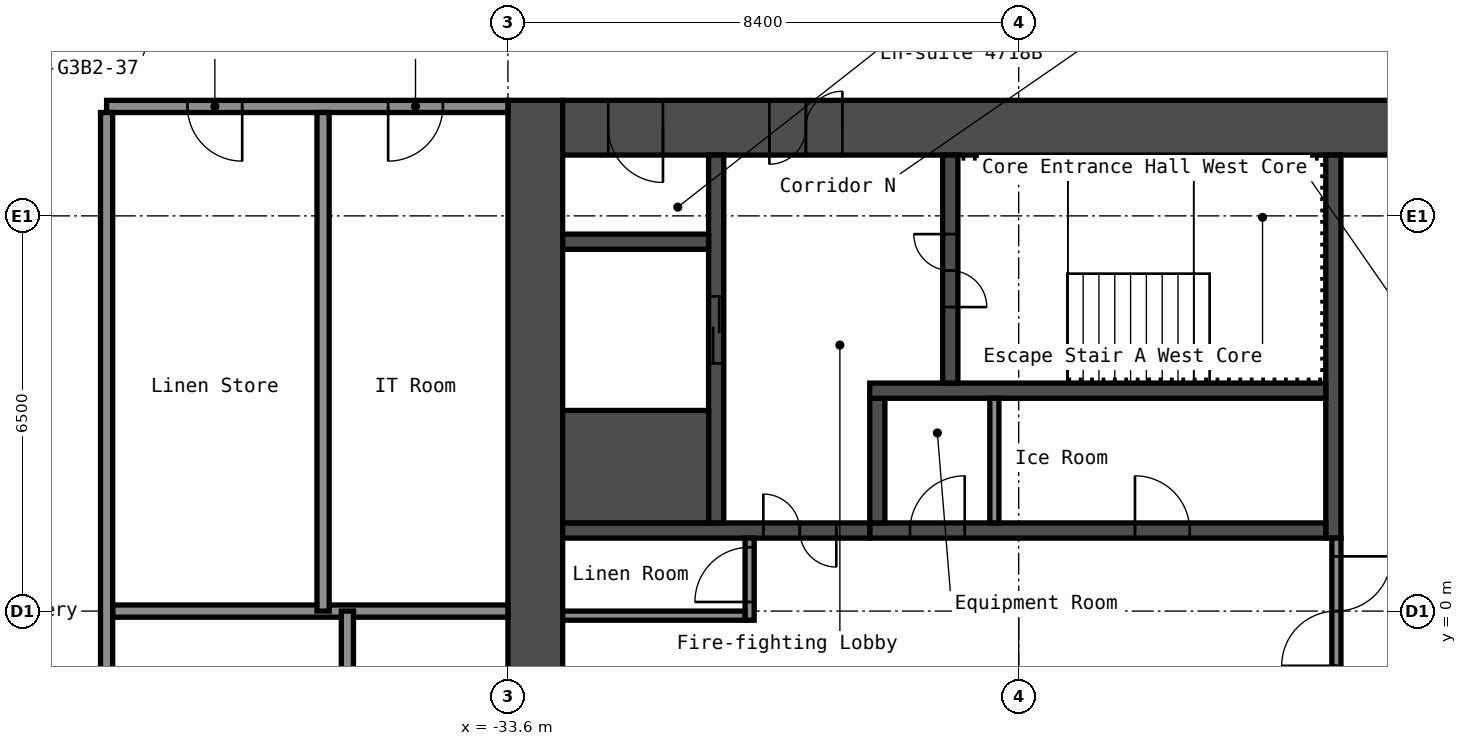
"""IFC4 building model, lengths in metres.
Left out: names, types, materials, properties, quantities, classifications, styles, units other than length and angle.
Written with IfcOpenShell. Run it as: python <this file> out.ifc"""

import sys

from ifc_helpers import new_model, si_unit, direction, frame, frame_2d, origin, place, context, subcontext, project, spatial, rectangle, extrude, element, fill, save


model = new_model("IFC4")
c1 = context("Model", 3, precision=1e-05, world=origin(), true_north=direction((0.0, 1.0)))
c2 = subcontext(c1, "Body", "Model", "MODEL_VIEW")
j1 = project(units=[si_unit("LENGTHUNIT", "METRE"), si_unit("PLANEANGLEUNIT", "RADIAN")], contexts=[c1])
p1 = place(None, origin())
s1 = spatial("IfcSite", under=j1, at=p1, CompositionType="ELEMENT")
p2 = place(p1, origin())
s2 = spatial("IfcBuilding", under=s1, at=p2, CompositionType="ELEMENT")
p3 = place(p2, frame((0.0, 0.0, 166.2)))
s3 = spatial("IfcBuildingStorey", under=s2, at=p3, CompositionType="ELEMENT", Elevation=166.2)
p4 = place(p3, frame((-33.15, -8.4, 0.0), z_axis=(0.0, 0.0, 1.0), x_axis=(0.0, 1.0, 0.0)))
e1 = element("IfcWall", 1, at=p4, inside=s3, PredefinedType="SHEAR", context=c2, shape_type="SweptSolid", body=[
    extrude(rectangle(XDim=16.8, YDim=0.9, at=frame_2d((8.4, 0.0))), origin(), (0.0, 0.0, 1.0), 2.75),
])
p5 = place(p3, frame((-32.7, 7.95, 0.0), z_axis=(0.0, 0.0, 1.0), x_axis=(1.0, 0.0, 0.0)))
e2 = element("IfcWall", 2, at=p5, inside=s3, PredefinedType="SHEAR", context=c2, shape_type="SweptSolid", body=[
    extrude(rectangle(XDim=15.0, YDim=0.9, at=frame_2d((7.5, 0.0))), origin(), (0.0, 0.0, 1.0), 2.75),
])
p6 = place(p5, frame((3.4, 0.0, 0.0)))
e3 = element("IfcOpeningElement", 3, at=p6, cuts=e2, PredefinedType="OPENING", context=c2, shape_type="SweptSolid", body=[
    extrude(rectangle(XDim=1.2, YDim=2.1, at=frame_2d((0.6, 1.05))), frame((0.0, 0.46, 0.0), z_axis=(0.0, -1.0, 0.0), x_axis=(1.0, 0.0, 0.0)), (0.0, 0.0, 1.0), 0.92),
])
p7 = place(p5, frame((0.75, 0.0, 0.0)))
e4 = element("IfcOpeningElement", 4, at=p7, cuts=e2, PredefinedType="OPENING", context=c2, shape_type="SweptSolid", body=[
    extrude(rectangle(XDim=0.9, YDim=2.1, at=frame_2d((0.45, 1.05))), frame((0.0, 0.46, 0.0), z_axis=(0.0, -1.0, 0.0), x_axis=(1.0, 0.0, 0.0)), (0.0, 0.0, 1.0), 0.92),
])
p8 = place(p3, frame((-20.025, 1.2, 0.0), z_axis=(0.0, 0.0, 1.0), x_axis=(0.0, 1.0, 0.0)))
e5 = element("IfcWall", 5, at=p8, inside=s3, PredefinedType="SHEAR", context=c2, shape_type="SweptSolid", body=[
    extrude(rectangle(XDim=6.3, YDim=0.25, at=frame_2d((3.15, 0.0))), origin(), (0.0, 0.0, 1.0), 2.75),
])
p9 = place(p3, frame((-27.65, 1.325, 0.0), z_axis=(0.0, 0.0, 1.0), x_axis=(1.0, 0.0, 0.0)))
e6 = element("IfcWall", 6, at=p9, inside=s3, PredefinedType="SHEAR", context=c2, shape_type="SweptSolid", body=[
    extrude(rectangle(XDim=7.5, YDim=0.25, at=frame_2d((3.75, 0.0))), origin(), (0.0, 0.0, 1.0), 2.75),
])
p10 = place(p9, frame((4.363, 0.0, 0.0)))
e7 = element("IfcOpeningElement", 7, at=p10, cuts=e6, PredefinedType="OPENING", context=c2, shape_type="SweptSolid", body=[
    extrude(rectangle(XDim=0.9, YDim=2.1, at=frame_2d((0.45, 1.05))), frame((0.0, 0.135, 0.0), z_axis=(0.0, -1.0, 0.0), x_axis=(1.0, 0.0, 0.0)), (0.0, 0.0, 1.0), 0.27),
])
p11 = place(p9, frame((0.663, 0.0, 0.0)))
e8 = element("IfcOpeningElement", 8, at=p11, cuts=e6, PredefinedType="OPENING", context=c2, shape_type="SweptSolid", body=[
    extrude(rectangle(XDim=0.9, YDim=2.1, at=frame_2d((0.45, 1.05))), frame((0.0, 0.135, 0.0), z_axis=(0.0, -1.0, 0.0), x_axis=(1.0, 0.0, 0.0)), (0.0, 0.0, 1.0), 0.27),
])
p12 = place(p3, frame((-27.525, 1.45, 0.0), z_axis=(0.0, 0.0, 1.0), x_axis=(0.0, 1.0, 0.0)))
e9 = element("IfcWall", 9, at=p12, inside=s3, PredefinedType="SHEAR", context=c2, shape_type="SweptSolid", body=[
    extrude(rectangle(XDim=2.05, YDim=0.25, at=frame_2d((1.025, 0.0))), origin(), (0.0, 0.0, 1.0), 2.75),
])
p13 = place(p3, frame((-27.65, 3.625, 0.0), z_axis=(0.0, 0.0, 1.0), x_axis=(1.0, 0.0, 0.0)))
e10 = element("IfcWall", 10, at=p13, inside=s3, PredefinedType="SHEAR", context=c2, shape_type="SweptSolid", body=[
    extrude(rectangle(XDim=7.5, YDim=0.25, at=frame_2d((3.75, 0.0))), origin(), (0.0, 0.0, 1.0), 2.75),
])
p14 = place(p3, frame((-26.325, 3.75, 0.0), z_axis=(0.0, 0.0, 1.0), x_axis=(0.0, 1.0, 0.0)))
e11 = element("IfcWall", 11, at=p14, inside=s3, PredefinedType="SHEAR", context=c2, shape_type="SweptSolid", body=[
    extrude(rectangle(XDim=3.75, YDim=0.25, at=frame_2d((1.875, 0.0))), origin(), (0.0, 0.0, 1.0), 2.75),
])
p15 = place(p14, frame((1.25, 0.0, 0.0)))
e12 = element("IfcOpeningElement", 12, at=p15, cuts=e11, PredefinedType="OPENING", context=c2, shape_type="SweptSolid", body=[
    extrude(rectangle(XDim=1.2, YDim=2.1, at=frame_2d((0.6, 1.05))), frame((0.0, 0.135, 0.0), z_axis=(0.0, -1.0, 0.0), x_axis=(1.0, 0.0, 0.0)), (0.0, 0.0, 1.0), 0.27),
])
p16 = place(p3, frame((-32.7, 1.325, 0.0), z_axis=(0.0, 0.0, 1.0), x_axis=(1.0, 0.0, 0.0)))
e13 = element("IfcWall", 13, at=p16, inside=s3, PredefinedType="SHEAR", context=c2, shape_type="SweptSolid", body=[
    extrude(rectangle(XDim=5.05, YDim=0.25, at=frame_2d((2.525, 0.0))), origin(), (0.0, 0.0, 1.0), 2.75),
])
p17 = place(p16, frame((3.3, 0.0, 0.0)))
e14 = element("IfcOpeningElement", 14, at=p17, cuts=e13, PredefinedType="OPENING", context=c2, shape_type="SweptSolid", body=[
    extrude(rectangle(XDim=1.2, YDim=2.1, at=frame_2d((0.6, 1.05))), frame((0.0, 0.135, 0.0), z_axis=(0.0, -1.0, 0.0), x_axis=(1.0, 0.0, 0.0)), (0.0, 0.0, 1.0), 0.27),
])
p18 = place(p3, frame((-30.175, 1.45, 0.0), z_axis=(0.0, 0.0, 1.0), x_axis=(0.0, 1.0, 0.0)))
e15 = element("IfcWall", 15, at=p18, inside=s3, PredefinedType="SHEAR", context=c2, shape_type="SweptSolid", body=[
    extrude(rectangle(XDim=6.05, YDim=0.25, at=frame_2d((3.025, 0.0))), origin(), (0.0, 0.0, 1.0), 2.75),
])
p19 = place(p18, frame((2.625, 0.0, 0.0)))
e16 = element("IfcOpeningElement", 16, at=p19, cuts=e15, PredefinedType="OPENING", context=c2, shape_type="SweptSolid", body=[
    extrude(rectangle(XDim=1.1, YDim=2.1, at=frame_2d((0.55, 1.05))), frame((0.0, 0.135, 0.0), z_axis=(0.0, -1.0, 0.0), x_axis=(1.0, 0.0, 0.0)), (0.0, 0.0, 1.0), 0.27),
])
p20 = place(p3, frame((-32.7, 2.375, 0.0), z_axis=(0.0, 0.0, 1.0), x_axis=(1.0, 0.0, 0.0)))
e17 = element("IfcWall", 17, at=p20, inside=s3, PredefinedType="SHEAR", context=c2, shape_type="SweptSolid", body=[
    extrude(rectangle(XDim=2.4, YDim=1.85, at=frame_2d((1.2, 0.0))), origin(), (0.0, 0.0, 1.0), 2.75),
])
p21 = place(p3, frame((-32.7, 6.075, 0.0), z_axis=(0.0, 0.0, 1.0), x_axis=(1.0, 0.0, 0.0)))
e18 = element("IfcWall", 18, at=p21, inside=s3, PredefinedType="SHEAR", context=c2, shape_type="SweptSolid", body=[
    extrude(rectangle(XDim=2.4, YDim=0.25, at=frame_2d((1.2, 0.0))), origin(), (0.0, 0.0, 1.0), 2.75),
])
p22 = place(p3, frame((-19.975, -1.2, 0.0), z_axis=(0.0, 0.0, 1.0), x_axis=(0.0, 1.0, 0.0)))
e19 = element("IfcWall", 19, at=p22, inside=s3, PredefinedType="PARTITIONING", context=c2, shape_type="SweptSolid", body=[
    extrude(rectangle(XDim=2.4, YDim=0.15, at=frame_2d((1.2, 0.0))), origin(), (0.0, 0.0, 1.0), 2.75),
])
p23 = place(p22, frame((0.3, 0.0, 0.0)))
e20 = element("IfcOpeningElement", 20, at=p23, cuts=e19, PredefinedType="OPENING", context=c2, shape_type="SweptSolid", body=[
    extrude(rectangle(XDim=1.8, YDim=2.1, at=frame_2d((0.9, 1.05))), frame((0.0, 0.085, 0.0), z_axis=(0.0, -1.0, 0.0), x_axis=(1.0, 0.0, 0.0)), (0.0, 0.0, 1.0), 0.17),
])
p24 = place(p3, frame((-29.625, -0.15, 0.0), z_axis=(0.0, 0.0, 1.0), x_axis=(0.0, 1.0, 0.0)))
e21 = element("IfcWall", 21, at=p24, inside=s3, PredefinedType="PARTITIONING", context=c2, shape_type="SweptSolid", body=[
    extrude(rectangle(XDim=1.35, YDim=0.15, at=frame_2d((0.675, 0.0))), origin(), (0.0, 0.0, 1.0), 2.75),
])
p25 = place(p24, frame((0.3, 0.0, 0.0)))
e22 = element("IfcOpeningElement", 22, at=p25, cuts=e21, PredefinedType="OPENING", context=c2, shape_type="SweptSolid", body=[
    extrude(rectangle(XDim=0.9, YDim=2.1, at=frame_2d((0.45, 1.05))), frame((0.0, 0.085, 0.0), z_axis=(0.0, -1.0, 0.0), x_axis=(1.0, 0.0, 0.0)), (0.0, 0.0, 1.0), 0.17),
])
p26 = place(p3, frame((-32.7, -0.075, 0.0), z_axis=(0.0, 0.0, 1.0), x_axis=(1.0, 0.0, 0.0)))
e23 = element("IfcWall", 23, at=p26, inside=s3, PredefinedType="PARTITIONING", context=c2, shape_type="SweptSolid", body=[
    extrude(rectangle(XDim=3.0, YDim=0.15, at=frame_2d((1.5, 0.0))), origin(), (0.0, 0.0, 1.0), 2.75),
])
p27 = place(p3, frame((-25.6, 1.45, 0.0), z_axis=(0.0, 0.0, 1.0), x_axis=(0.0, 1.0, 0.0)))
e24 = element("IfcWall", 24, at=p27, inside=s3, PredefinedType="PARTITIONING", context=c2, shape_type="SweptSolid", body=[
    extrude(rectangle(XDim=2.05, YDim=0.15, at=frame_2d((1.025, 0.0))), origin(), (0.0, 0.0, 1.0), 2.75),
])
p28 = place(p3, frame((-40.1, 0.0, 0.0), z_axis=(0.0, 0.0, 1.0), x_axis=(1.0, 0.0, 0.0)))
e25 = element("IfcWall", 25, at=p28, inside=s3, PredefinedType="PARTITIONING", context=c2, shape_type="SweptSolid", body=[
    extrude(rectangle(XDim=6.5, YDim=0.2, at=frame_2d((3.25, 0.0))), origin(), (0.0, 0.0, 1.0), 2.75),
])
p29 = place(p3, frame((-40.2, 8.3, 0.0), z_axis=(0.0, 0.0, 1.0), x_axis=(1.0, 0.0, 0.0)))
e26 = element("IfcWall", 26, at=p29, inside=s3, PredefinedType="PARTITIONING", context=c2, shape_type="SweptSolid", body=[
    extrude(rectangle(XDim=6.6, YDim=0.2, at=frame_2d((3.3, 0.0))), origin(), (0.0, 0.0, 1.0), 2.75),
])
p30 = place(p29, frame((1.33, 0.0, 0.0)))
e27 = element("IfcOpeningElement", 27, at=p30, cuts=e26, PredefinedType="OPENING", context=c2, shape_type="SweptSolid", body=[
    extrude(rectangle(XDim=0.9, YDim=2.1, at=frame_2d((0.45, 1.05))), frame((0.0, 0.11, 0.0), z_axis=(0.0, -1.0, 0.0), x_axis=(1.0, 0.0, 0.0)), (0.0, 0.0, 1.0), 0.22),
])
p31 = place(p29, frame((4.63, 0.0, 0.0)))
e28 = element("IfcOpeningElement", 28, at=p31, cuts=e26, PredefinedType="OPENING", context=c2, shape_type="SweptSolid", body=[
    extrude(rectangle(XDim=0.9, YDim=2.1, at=frame_2d((0.45, 1.05))), frame((0.0, 0.11, 0.0), z_axis=(0.0, -1.0, 0.0), x_axis=(1.0, 0.0, 0.0)), (0.0, 0.0, 1.0), 0.22),
])
p32 = place(p3, frame((-40.2, -8.2, 0.0), z_axis=(0.0, 0.0, 1.0), x_axis=(0.0, 1.0, 0.0)))
e29 = element("IfcWall", 29, at=p32, inside=s3, PredefinedType="PARTITIONING", context=c2, shape_type="SweptSolid", body=[
    extrude(rectangle(XDim=16.4, YDim=0.2, at=frame_2d((8.2, 0.0))), origin(), (0.0, 0.0, 1.0), 2.75),
])
for number, where, z_axis, x_axis in (
    (30, (-36.64, 0.0, 0.0), (0.0, 0.0, 1.0), (0.0, 1.0, 0.0)),
    (31, (-36.24, -8.2, 0.0), (0.0, 0.0, 1.0), (0.0, 1.0, 0.0)),
):
    element("IfcWall", number, at=place(p3, frame(where, z_axis=z_axis, x_axis=x_axis)), inside=s3, PredefinedType="PARTITIONING", context=c2, shape_type="SweptSolid", body=[
        extrude(rectangle(XDim=8.2, YDim=0.2, at=frame_2d((4.1, 0.0))), origin(), (0.0, 0.0, 1.0), 2.75),
    ])
p33 = place(p6, origin())
e32 = element("IfcDoor", 32, at=p33, inside=s3, OperationType="DOUBLE_DOOR_SINGLE_SWING", PredefinedType="DOOR", context=c2, shape_type="SweptSolid", body=[
    extrude(rectangle(XDim=1.2, YDim=2.1, at=frame_2d((0.6, 1.05))), frame((0.0, 0.025, 0.0), z_axis=(0.0, -1.0, 0.0), x_axis=(1.0, 0.0, 0.0)), (0.0, 0.0, 1.0), 0.05),
])
fill(e3, e32)
p34 = place(p7, origin())
e33 = element("IfcDoor", 33, at=p34, inside=s3, OperationType="SINGLE_SWING_RIGHT", PredefinedType="DOOR", context=c2, shape_type="SweptSolid", body=[
    extrude(rectangle(XDim=0.9, YDim=2.1, at=frame_2d((0.45, 1.05))), frame((0.0, 0.025, 0.0), z_axis=(0.0, -1.0, 0.0), x_axis=(1.0, 0.0, 0.0)), (0.0, 0.0, 1.0), 0.05),
])
fill(e4, e33)
p35 = place(p15, origin())
e34 = element("IfcDoor", 34, at=p35, inside=s3, OperationType="DOUBLE_DOOR_SINGLE_SWING", PredefinedType="DOOR", context=c2, shape_type="SweptSolid", body=[
    extrude(rectangle(XDim=1.2, YDim=2.1, at=frame_2d((0.6, 1.05))), frame((0.0, 0.025, 0.0), z_axis=(0.0, -1.0, 0.0), x_axis=(1.0, 0.0, 0.0)), (0.0, 0.0, 1.0), 0.05),
])
fill(e12, e34)
p36 = place(p17, origin())
e35 = element("IfcDoor", 35, at=p36, inside=s3, OperationType="DOUBLE_DOOR_SINGLE_SWING", PredefinedType="DOOR", context=c2, shape_type="SweptSolid", body=[
    extrude(rectangle(XDim=1.2, YDim=2.1, at=frame_2d((0.6, 1.05))), frame((0.0, 0.025, 0.0), z_axis=(0.0, -1.0, 0.0), x_axis=(1.0, 0.0, 0.0)), (0.0, 0.0, 1.0), 0.05),
])
fill(e14, e35)
p37 = place(p23, origin())
e36 = element("IfcDoor", 36, at=p37, inside=s3, OperationType="DOUBLE_DOOR_SINGLE_SWING", PredefinedType="DOOR", context=c2, shape_type="SweptSolid", body=[
    extrude(rectangle(XDim=1.8, YDim=2.1, at=frame_2d((0.9, 1.05))), frame((0.0, 0.025, 0.0), z_axis=(0.0, -1.0, 0.0), x_axis=(1.0, 0.0, 0.0)), (0.0, 0.0, 1.0), 0.05),
])
fill(e20, e36)
p38 = place(p25, origin())
e37 = element("IfcDoor", 37, at=p38, inside=s3, OperationType="SINGLE_SWING_RIGHT", PredefinedType="DOOR", context=c2, shape_type="SweptSolid", body=[
    extrude(rectangle(XDim=0.9, YDim=2.1, at=frame_2d((0.45, 1.05))), frame((0.0, 0.025, 0.0), z_axis=(0.0, -1.0, 0.0), x_axis=(1.0, 0.0, 0.0)), (0.0, 0.0, 1.0), 0.05),
])
fill(e22, e37)
p39 = place(p10, origin())
e38 = element("IfcDoor", 38, at=p39, inside=s3, OperationType="SINGLE_SWING_RIGHT", PredefinedType="DOOR", context=c2, shape_type="SweptSolid", body=[
    extrude(rectangle(XDim=0.9, YDim=2.1, at=frame_2d((0.45, 1.05))), frame((0.0, 0.025, 0.0), z_axis=(0.0, -1.0, 0.0), x_axis=(1.0, 0.0, 0.0)), (0.0, 0.0, 1.0), 0.05),
])
fill(e7, e38)
p40 = place(p11, origin())
e39 = element("IfcDoor", 39, at=p40, inside=s3, OperationType="SINGLE_SWING_LEFT", PredefinedType="DOOR", context=c2, shape_type="SweptSolid", body=[
    extrude(rectangle(XDim=0.9, YDim=2.1, at=frame_2d((0.45, 1.05))), frame((0.0, 0.025, 0.0), z_axis=(0.0, -1.0, 0.0), x_axis=(1.0, 0.0, 0.0)), (0.0, 0.0, 1.0), 0.05),
])
fill(e8, e39)
p41 = place(p19, origin())
e40 = element("IfcDoor", 40, at=p41, inside=s3, OperationType="DOUBLE_DOOR_SLIDING", PredefinedType="DOOR", context=c2, shape_type="SweptSolid", body=[
    extrude(rectangle(XDim=1.1, YDim=2.1, at=frame_2d((0.55, 1.05))), frame((0.0, 0.025, 0.0), z_axis=(0.0, -1.0, 0.0), x_axis=(1.0, 0.0, 0.0)), (0.0, 0.0, 1.0), 0.05),
])
fill(e16, e40)
p42 = place(p30, origin())
e41 = element("IfcDoor", 41, at=p42, inside=s3, OperationType="SINGLE_SWING_RIGHT", PredefinedType="DOOR", context=c2, shape_type="SweptSolid", body=[
    extrude(rectangle(XDim=0.9, YDim=2.1, at=frame_2d((0.45, 1.05))), frame((0.0, 0.025, 0.0), z_axis=(0.0, -1.0, 0.0), x_axis=(1.0, 0.0, 0.0)), (0.0, 0.0, 1.0), 0.05),
])
fill(e27, e41)
p43 = place(p31, origin())
e42 = element("IfcDoor", 42, at=p43, inside=s3, OperationType="SINGLE_SWING_LEFT", PredefinedType="DOOR", context=c2, shape_type="SweptSolid", body=[
    extrude(rectangle(XDim=0.9, YDim=2.1, at=frame_2d((0.45, 1.05))), frame((0.0, 0.025, 0.0), z_axis=(0.0, -1.0, 0.0), x_axis=(1.0, 0.0, 0.0)), (0.0, 0.0, 1.0), 0.05),
])
fill(e28, e42)
save(model, sys.argv[1])
